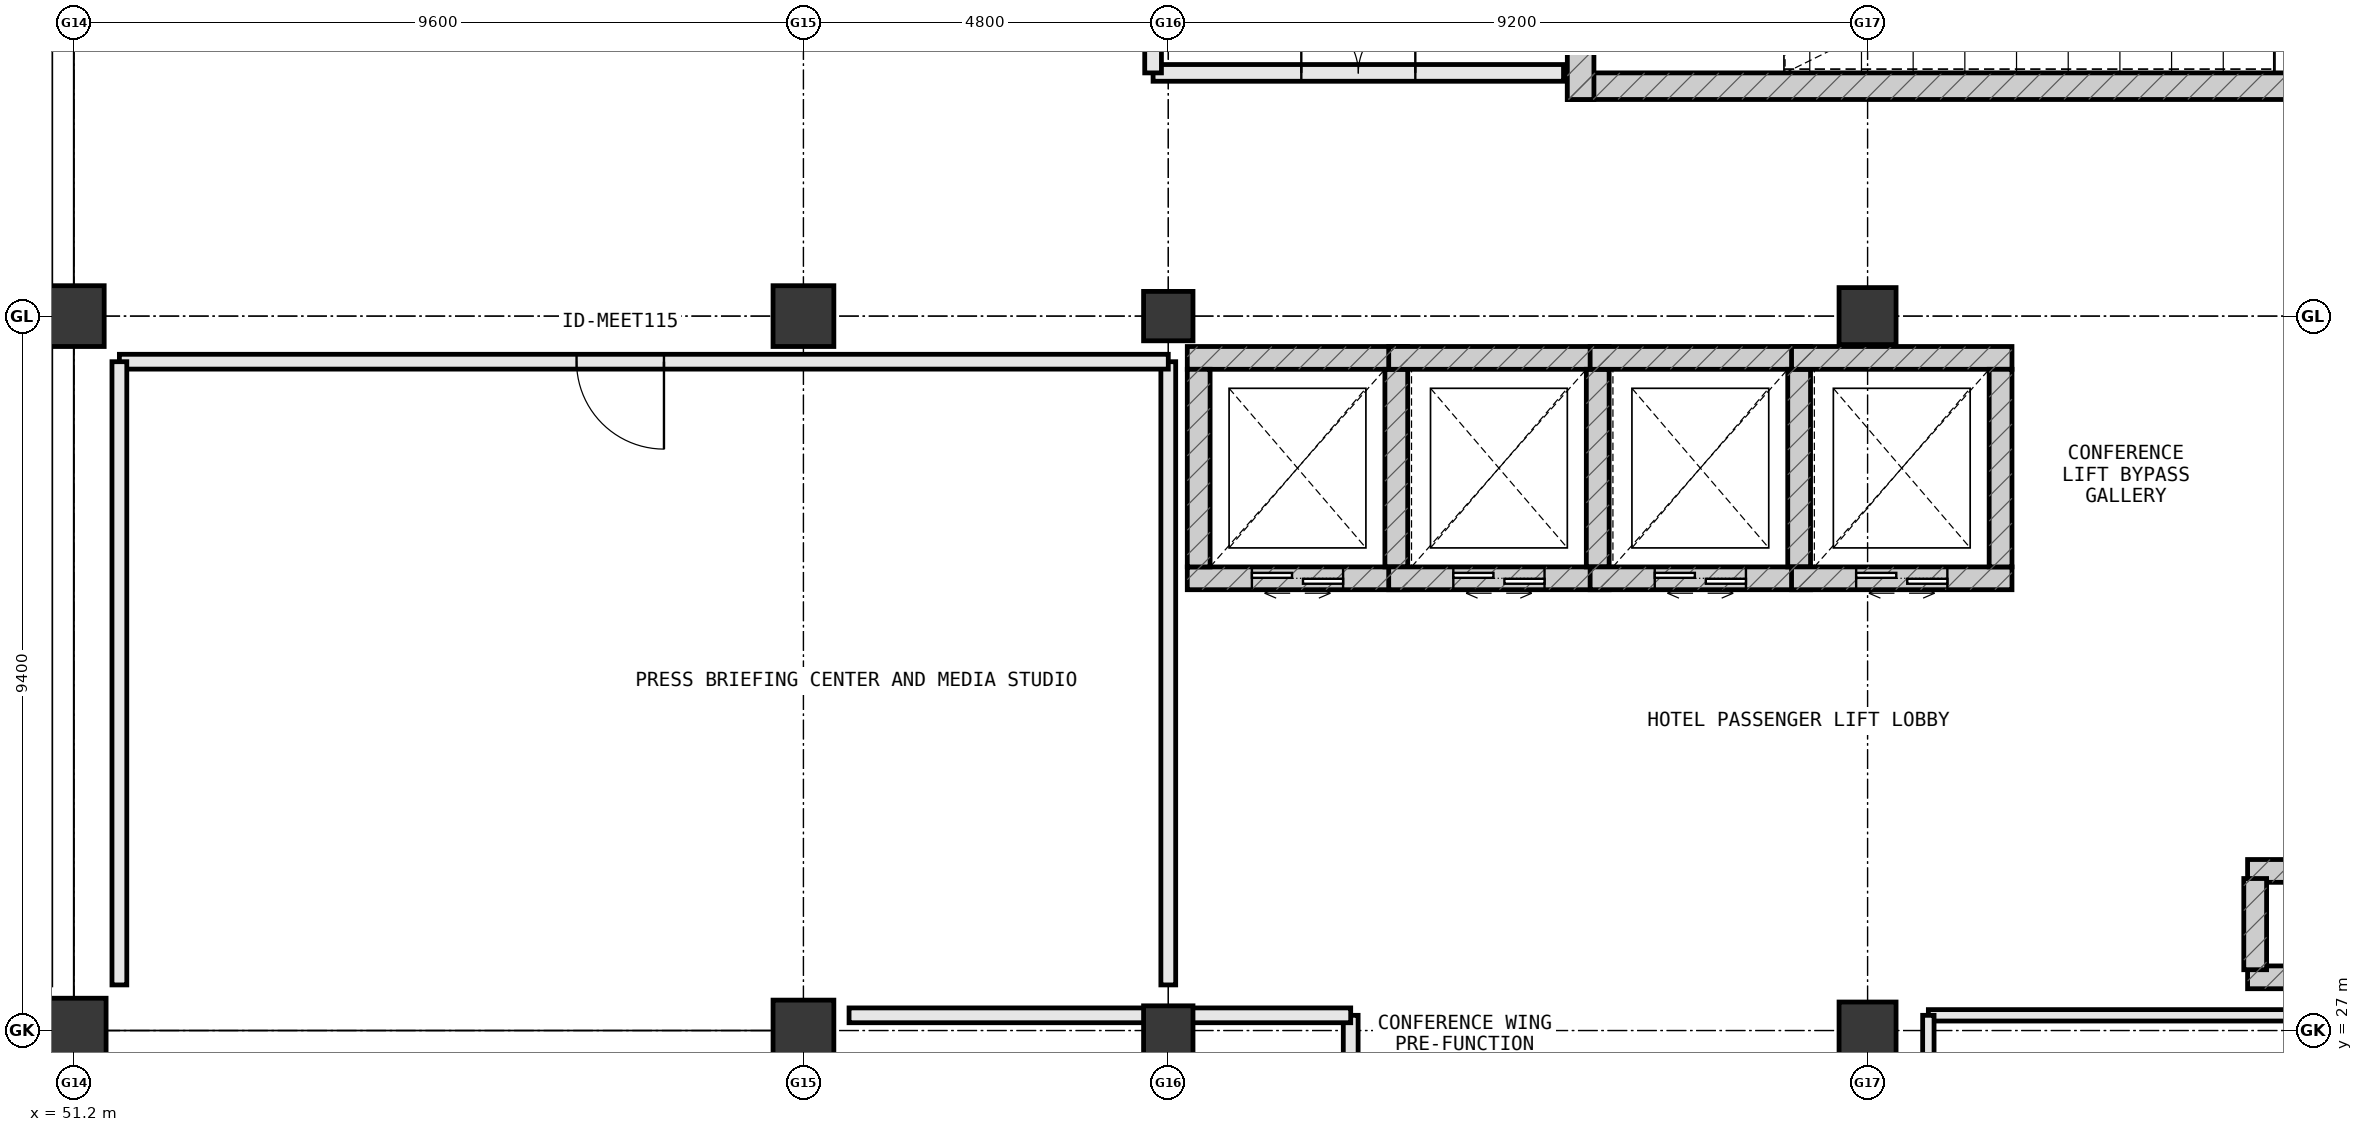
"""IFC4 building model, lengths in metres.
Left out: names, types, materials, properties, quantities, classifications, styles, units other than length and angle.
Written with IfcOpenShell. Run it as: python <this file> out.ifc"""

import sys

from ifc_helpers import new_model, si_unit, direction, frame, frame_2d, origin, origin_2d, place, context, subcontext, project, spatial, rectangle, extrude, element, fill, save


model = new_model("IFC4")
c1 = context("Model", 3, precision=1e-05, world=origin(), true_north=direction((0.0, 1.0)))
c2 = subcontext(c1, "Body", "Model", "MODEL_VIEW")
j1 = project(units=[si_unit("LENGTHUNIT", "METRE"), si_unit("PLANEANGLEUNIT", "RADIAN")], contexts=[c1])
p1 = place(None, origin())
s1 = spatial("IfcSite", under=j1, at=p1, CompositionType="ELEMENT")
p2 = place(p1, origin())
s2 = spatial("IfcBuilding", under=s1, at=p2, CompositionType="ELEMENT")
p3 = place(p2, frame((0.0, 0.0, 5.4)))
s3 = spatial("IfcBuildingStorey", under=s2, at=p3, CompositionType="ELEMENT", Elevation=5.4)
for number, where, z_axis, x_axis in (
    (1, (60.8, 27.0, 0.0), (0.0, 0.0, 1.0), (1.0, 0.0, 0.0)),
    (2, (60.8, 36.4, 0.0), (0.0, 0.0, 1.0), (1.0, 0.0, 0.0)),
):
    element("IfcColumn", number, at=place(p3, frame(where, z_axis=z_axis, x_axis=x_axis)), inside=s3, PredefinedType="COLUMN", context=c2, shape_type="SweptSolid", body=[
        extrude(rectangle(XDim=0.8, YDim=0.8, at=origin_2d()), origin(), (0.0, 0.0, 1.0), 5.4),
    ])
for number, where, z_axis, x_axis in (
    (3, (74.8, 27.0, 0.0), (0.0, 0.0, 1.0), (1.0, 0.0, 0.0)),
    (4, (74.8, 36.4, 0.0), (0.0, 0.0, 1.0), (1.0, 0.0, 0.0)),
):
    element("IfcColumn", number, at=place(p3, frame(where, z_axis=z_axis, x_axis=x_axis)), inside=s3, PredefinedType="COLUMN", context=c2, shape_type="SweptSolid", body=[
        extrude(rectangle(XDim=0.75, YDim=0.75, at=origin_2d()), origin(), (0.0, 0.0, 1.0), 5.4),
    ])
for number, where, z_axis, x_axis in (
    (5, (65.6, 27.0, 0.0), (0.0, 0.0, 1.0), (1.0, 0.0, 0.0)),
    (6, (65.6, 36.4, 0.0), (0.0, 0.0, 1.0), (1.0, 0.0, 0.0)),
):
    element("IfcColumn", number, at=place(p3, frame(where, z_axis=z_axis, x_axis=x_axis)), inside=s3, PredefinedType="COLUMN", context=c2, shape_type="SweptSolid", body=[
        extrude(rectangle(XDim=0.65, YDim=0.65, at=origin_2d()), origin(), (0.0, 0.0, 1.0), 5.4),
    ])
p4 = place(p3, frame((51.2, 27.0, 0.0), z_axis=(0.0, 0.0, 1.0), x_axis=(1.0, 0.0, 0.0)))
e7 = element("IfcColumn", 7, at=p4, inside=s3, PredefinedType="COLUMN", context=c2, shape_type="SweptSolid", body=[
    extrude(rectangle(XDim=0.85, YDim=0.85, at=origin_2d()), origin(), (0.0, 0.0, 1.0), 5.4),
])
p5 = place(p3, frame((51.2, 36.4, 0.0), z_axis=(0.0, 0.0, 1.0), x_axis=(1.0, 0.0, 0.0)))
e8 = element("IfcColumn", 8, at=p5, inside=s3, PredefinedType="COLUMN", context=c2, shape_type="SweptSolid", body=[
    extrude(rectangle(XDim=0.8, YDim=0.8, at=origin_2d()), origin(), (0.0, 0.0, 1.0), 5.4),
])
for number, where, z_axis, x_axis in (
    (9, (79.8, 27.7, 0.0), (0.0, 0.0, 1.0), (1.0, 0.0, 0.0)),
    (10, (81.4, 29.1, 0.0), (0.0, 0.0, 1.0), (-1.0, 0.0, 0.0)),
):
    element("IfcWall", number, at=place(p3, frame(where, z_axis=z_axis, x_axis=x_axis)), inside=s3, PredefinedType="SHEAR", context=c2, shape_type="SweptSolid", body=[
        extrude(rectangle(XDim=1.6, YDim=0.3, at=frame_2d((0.8, 0.0))), origin(), (0.0, 0.0, 1.0), 5.13),
    ])
p6 = place(p3, frame((79.9, 29.0, 0.0), z_axis=(0.0, 0.0, 1.0), x_axis=(0.0, -1.0, 0.0)))
e11 = element("IfcWall", 11, at=p6, inside=s3, PredefinedType="SHEAR", context=c2, shape_type="SweptSolid", body=[
    extrude(rectangle(XDim=1.2, YDim=0.3, at=frame_2d((0.6, 0.0))), origin(), (0.0, 0.0, 1.0), 5.13),
])
p7 = place(p3, frame((70.85, 39.425, 0.0), z_axis=(0.0, 0.0, 1.0), x_axis=(1.0, 0.0, 0.0)))
e12 = element("IfcWall", 12, at=p7, inside=s3, PredefinedType="SHEAR", context=c2, shape_type="SweptSolid", body=[
    extrude(rectangle(XDim=12.1, YDim=0.35, at=frame_2d((6.05, 0.0))), origin(), (0.0, 0.0, 1.0), 5.4),
])
p8 = place(p3, frame((71.025, 44.35, 0.0), z_axis=(0.0, 0.0, 1.0), x_axis=(0.0, -1.0, 0.0)))
e13 = element("IfcWall", 13, at=p8, inside=s3, PredefinedType="SHEAR", context=c2, shape_type="SweptSolid", body=[
    extrude(rectangle(XDim=5.1, YDim=0.35, at=frame_2d((2.55, 0.0))), origin(), (0.0, 0.0, 1.0), 5.4),
])
p9 = place(p8, frame((2.0, 0.0, 0.0)))
e14 = element("IfcOpeningElement", 14, at=p9, cuts=e13, PredefinedType="OPENING", context=c2, shape_type="SweptSolid", body=[
    extrude(rectangle(XDim=1.1, YDim=2.2, at=frame_2d((0.55, 1.1))), frame((0.0, 0.187, 0.0), z_axis=(0.0, -1.0, 0.0), x_axis=(1.0, 0.0, 0.0)), (0.0, 0.0, 1.0), 0.374),
])
p10 = place(p3, frame((65.85, 32.95, 0.0), z_axis=(0.0, 0.0, 1.0), x_axis=(1.0, 0.0, 0.0)))
e15 = element("IfcWall", 15, at=p10, inside=s3, PredefinedType="SHEAR", context=c2, shape_type="SweptSolid", body=[
    extrude(rectangle(XDim=2.9, YDim=0.3, at=frame_2d((1.45, 0.0))), origin(), (0.0, 0.0, 1.0), 5.4),
])
p11 = place(p10, frame((0.85, 0.0, 0.0)))
e16 = element("IfcOpeningElement", 16, at=p11, cuts=e15, PredefinedType="OPENING", context=c2, shape_type="SweptSolid", body=[
    extrude(rectangle(XDim=1.2, YDim=2.2, at=frame_2d((0.6, 1.1))), frame((0.0, 0.162, 0.0), z_axis=(0.0, -1.0, 0.0), x_axis=(1.0, 0.0, 0.0)), (0.0, 0.0, 1.0), 0.324),
])
p12 = place(p3, frame((68.75, 35.85, 0.0), z_axis=(0.0, 0.0, 1.0), x_axis=(-1.0, 0.0, 0.0)))
e17 = element("IfcWall", 17, at=p12, inside=s3, PredefinedType="SHEAR", context=c2, shape_type="SweptSolid", body=[
    extrude(rectangle(XDim=2.9, YDim=0.3, at=frame_2d((1.45, 0.0))), origin(), (0.0, 0.0, 1.0), 5.4),
])
for number, where, z_axis, x_axis in (
    (18, (68.6, 33.1, 0.0), (0.0, 0.0, 1.0), (0.0, 1.0, 0.0)),
    (19, (66.0, 35.7, 0.0), (0.0, 0.0, 1.0), (0.0, -1.0, 0.0)),
):
    element("IfcWall", number, at=place(p3, frame(where, z_axis=z_axis, x_axis=x_axis)), inside=s3, PredefinedType="SHEAR", context=c2, shape_type="SweptSolid", body=[
        extrude(rectangle(XDim=2.6, YDim=0.3, at=frame_2d((1.3, 0.0))), origin(), (0.0, 0.0, 1.0), 5.4),
    ])
p13 = place(p3, frame((68.5, 32.95, 0.0), z_axis=(0.0, 0.0, 1.0), x_axis=(1.0, 0.0, 0.0)))
e20 = element("IfcWall", 20, at=p13, inside=s3, PredefinedType="SHEAR", context=c2, shape_type="SweptSolid", body=[
    extrude(rectangle(XDim=2.9, YDim=0.3, at=frame_2d((1.45, 0.0))), origin(), (0.0, 0.0, 1.0), 5.4),
])
p14 = place(p13, frame((0.85, 0.0, 0.0)))
e21 = element("IfcOpeningElement", 21, at=p14, cuts=e20, PredefinedType="OPENING", context=c2, shape_type="SweptSolid", body=[
    extrude(rectangle(XDim=1.2, YDim=2.2, at=frame_2d((0.6, 1.1))), frame((0.0, 0.162, 0.0), z_axis=(0.0, -1.0, 0.0), x_axis=(1.0, 0.0, 0.0)), (0.0, 0.0, 1.0), 0.324),
])
p15 = place(p3, frame((71.4, 35.85, 0.0), z_axis=(0.0, 0.0, 1.0), x_axis=(-1.0, 0.0, 0.0)))
e22 = element("IfcWall", 22, at=p15, inside=s3, PredefinedType="SHEAR", context=c2, shape_type="SweptSolid", body=[
    extrude(rectangle(XDim=2.9, YDim=0.3, at=frame_2d((1.45, 0.0))), origin(), (0.0, 0.0, 1.0), 5.4),
])
p16 = place(p3, frame((71.25, 33.1, 0.0), z_axis=(0.0, 0.0, 1.0), x_axis=(0.0, 1.0, 0.0)))
e23 = element("IfcWall", 23, at=p16, inside=s3, PredefinedType="SHEAR", context=c2, shape_type="SweptSolid", body=[
    extrude(rectangle(XDim=2.6, YDim=0.3, at=frame_2d((1.3, 0.0))), origin(), (0.0, 0.0, 1.0), 5.4),
])
p17 = place(p3, frame((71.15, 32.95, 0.0), z_axis=(0.0, 0.0, 1.0), x_axis=(1.0, 0.0, 0.0)))
e24 = element("IfcWall", 24, at=p17, inside=s3, PredefinedType="SHEAR", context=c2, shape_type="SweptSolid", body=[
    extrude(rectangle(XDim=2.9, YDim=0.3, at=frame_2d((1.45, 0.0))), origin(), (0.0, 0.0, 1.0), 5.4),
])
p18 = place(p17, frame((0.85, 0.0, 0.0)))
e25 = element("IfcOpeningElement", 25, at=p18, cuts=e24, PredefinedType="OPENING", context=c2, shape_type="SweptSolid", body=[
    extrude(rectangle(XDim=1.2, YDim=2.2, at=frame_2d((0.6, 1.1))), frame((0.0, 0.162, 0.0), z_axis=(0.0, -1.0, 0.0), x_axis=(1.0, 0.0, 0.0)), (0.0, 0.0, 1.0), 0.324),
])
p19 = place(p3, frame((74.05, 35.85, 0.0), z_axis=(0.0, 0.0, 1.0), x_axis=(-1.0, 0.0, 0.0)))
e26 = element("IfcWall", 26, at=p19, inside=s3, PredefinedType="SHEAR", context=c2, shape_type="SweptSolid", body=[
    extrude(rectangle(XDim=2.9, YDim=0.3, at=frame_2d((1.45, 0.0))), origin(), (0.0, 0.0, 1.0), 5.4),
])
p20 = place(p3, frame((73.9, 33.1, 0.0), z_axis=(0.0, 0.0, 1.0), x_axis=(0.0, 1.0, 0.0)))
e27 = element("IfcWall", 27, at=p20, inside=s3, PredefinedType="SHEAR", context=c2, shape_type="SweptSolid", body=[
    extrude(rectangle(XDim=2.6, YDim=0.3, at=frame_2d((1.3, 0.0))), origin(), (0.0, 0.0, 1.0), 5.4),
])
p21 = place(p3, frame((73.8, 32.95, 0.0), z_axis=(0.0, 0.0, 1.0), x_axis=(1.0, 0.0, 0.0)))
e28 = element("IfcWall", 28, at=p21, inside=s3, PredefinedType="SHEAR", context=c2, shape_type="SweptSolid", body=[
    extrude(rectangle(XDim=2.9, YDim=0.3, at=frame_2d((1.45, 0.0))), origin(), (0.0, 0.0, 1.0), 5.4),
])
p22 = place(p21, frame((0.85, 0.0, 0.0)))
e29 = element("IfcOpeningElement", 29, at=p22, cuts=e28, PredefinedType="OPENING", context=c2, shape_type="SweptSolid", body=[
    extrude(rectangle(XDim=1.2, YDim=2.2, at=frame_2d((0.6, 1.1))), frame((0.0, 0.162, 0.0), z_axis=(0.0, -1.0, 0.0), x_axis=(1.0, 0.0, 0.0)), (0.0, 0.0, 1.0), 0.324),
])
p23 = place(p3, frame((76.7, 35.85, 0.0), z_axis=(0.0, 0.0, 1.0), x_axis=(-1.0, 0.0, 0.0)))
e30 = element("IfcWall", 30, at=p23, inside=s3, PredefinedType="SHEAR", context=c2, shape_type="SweptSolid", body=[
    extrude(rectangle(XDim=2.9, YDim=0.3, at=frame_2d((1.45, 0.0))), origin(), (0.0, 0.0, 1.0), 5.4),
])
p24 = place(p3, frame((76.55, 33.1, 0.0), z_axis=(0.0, 0.0, 1.0), x_axis=(0.0, 1.0, 0.0)))
e31 = element("IfcWall", 31, at=p24, inside=s3, PredefinedType="SHEAR", context=c2, shape_type="SweptSolid", body=[
    extrude(rectangle(XDim=2.6, YDim=0.3, at=frame_2d((1.3, 0.0))), origin(), (0.0, 0.0, 1.0), 5.4),
])
p25 = place(p3, frame((65.4, 39.6, 0.0), z_axis=(0.0, 0.0, 1.0), x_axis=(1.0, 0.0, 0.0)))
e32 = element("IfcWall", 32, at=p25, inside=s3, PredefinedType="STANDARD", context=c2, shape_type="SweptSolid", body=[
    extrude(rectangle(XDim=5.4, YDim=0.22, at=frame_2d((2.7, 0.0))), origin(), (0.0, 0.0, 1.0), 5.13),
])
p26 = place(p25, frame((1.95, 0.0, 0.0)))
e33 = element("IfcOpeningElement", 33, at=p26, cuts=e32, PredefinedType="OPENING", context=c2, shape_type="SweptSolid", body=[
    extrude(rectangle(XDim=1.5, YDim=2.2, at=frame_2d((0.75, 1.1))), frame((0.0, 0.122, 0.0), z_axis=(0.0, -1.0, 0.0), x_axis=(1.0, 0.0, 0.0)), (0.0, 0.0, 1.0), 0.244),
])
p27 = place(p3, frame((65.4, 43.85, 0.0), z_axis=(0.0, 0.0, 1.0), x_axis=(0.0, -1.0, 0.0)))
e34 = element("IfcWall", 34, at=p27, inside=s3, PredefinedType="STANDARD", context=c2, shape_type="SweptSolid", body=[
    extrude(rectangle(XDim=4.25, YDim=0.22, at=frame_2d((2.125, 0.0))), origin(), (0.0, 0.0, 1.0), 5.13),
])
p28 = place(p27, frame((1.375, 0.0, 0.0)))
e35 = element("IfcOpeningElement", 35, at=p28, cuts=e34, PredefinedType="OPENING", context=c2, shape_type="SweptSolid", body=[
    extrude(rectangle(XDim=1.5, YDim=2.2, at=frame_2d((0.75, 1.1))), frame((0.0, 0.122, 0.0), z_axis=(0.0, -1.0, 0.0), x_axis=(1.0, 0.0, 0.0)), (0.0, 0.0, 1.0), 0.244),
])
p29 = place(p3, frame((68.0, 16.2, 0.0), z_axis=(0.0, 0.0, 1.0), x_axis=(0.0, 1.0, 0.0)))
e36 = element("IfcWall", 36, at=p29, inside=s3, PredefinedType="PARTITIONING", context=c2, shape_type="SweptSolid", body=[
    extrude(rectangle(XDim=11.0, YDim=0.195, at=frame_2d((5.5, 0.0))), origin(), (0.0, 0.0, 1.0), 5.13),
])
p30 = place(p29, frame((4.925, 0.0, 0.0)))
e37 = element("IfcOpeningElement", 37, at=p30, cuts=e36, PredefinedType="OPENING", context=c2, shape_type="SweptSolid", body=[
    extrude(rectangle(XDim=1.15, YDim=2.2, at=frame_2d((0.575, 1.1))), frame((0.0, 0.11, 0.0), z_axis=(0.0, -1.0, 0.0), x_axis=(1.0, 0.0, 0.0)), (0.0, 0.0, 1.0), 0.219),
])
p31 = place(p3, frame((68.0, 27.2, 0.0), z_axis=(0.0, 0.0, 1.0), x_axis=(-1.0, 0.0, 0.0)))
e38 = element("IfcWall", 38, at=p31, inside=s3, PredefinedType="PARTITIONING", context=c2, shape_type="SweptSolid", body=[
    extrude(rectangle(XDim=6.6, YDim=0.195, at=frame_2d((3.3, 0.0))), origin(), (0.0, 0.0, 1.0), 4.505),
])
p32 = place(p3, frame((83.4, 27.2, 0.0), z_axis=(0.0, 0.0, 1.0), x_axis=(-1.0, 0.0, 0.0)))
e39 = element("IfcWall", 39, at=p32, inside=s3, PredefinedType="PLUMBINGWALL", context=c2, shape_type="SweptSolid", body=[
    extrude(rectangle(XDim=7.8, YDim=0.15, at=frame_2d((3.9, 0.0))), origin(), (0.0, 0.0, 1.0), 4.505),
])
p33 = place(p3, frame((75.6, 27.2, 0.0), z_axis=(0.0, 0.0, 1.0), x_axis=(0.0, -1.0, 0.0)))
e40 = element("IfcWall", 40, at=p33, inside=s3, PredefinedType="PLUMBINGWALL", context=c2, shape_type="SweptSolid", body=[
    extrude(rectangle(XDim=8.6, YDim=0.15, at=frame_2d((4.3, 0.0))), origin(), (0.0, 0.0, 1.0), 5.13),
])
p34 = place(p33, frame((3.825, 0.0, 0.0)))
e41 = element("IfcOpeningElement", 41, at=p34, cuts=e40, PredefinedType="OPENING", context=c2, shape_type="SweptSolid", body=[
    extrude(rectangle(XDim=0.95, YDim=2.15, at=frame_2d((0.475, 1.075))), frame((0.0, 0.087, 0.0), z_axis=(0.0, -1.0, 0.0), x_axis=(1.0, 0.0, 0.0)), (0.0, 0.0, 1.0), 0.174),
])
p35 = place(p3, frame((65.6, 27.6, 0.0), z_axis=(0.0, 0.0, 1.0), x_axis=(0.0, 1.0, 0.0)))
e42 = element("IfcWall", 42, at=p35, inside=s3, PredefinedType="PARTITIONING", context=c2, shape_type="SweptSolid", body=[
    extrude(rectangle(XDim=8.2, YDim=0.195, at=frame_2d((4.1, 0.0))), origin(), (0.0, 0.0, 1.0), 4.505),
])
p36 = place(p3, frame((65.6, 35.8, 0.0), z_axis=(0.0, 0.0, 1.0), x_axis=(-1.0, 0.0, 0.0)))
e43 = element("IfcWall", 43, at=p36, inside=s3, PredefinedType="PARTITIONING", context=c2, shape_type="SweptSolid", body=[
    extrude(rectangle(XDim=13.8, YDim=0.195, at=frame_2d((6.9, 0.0))), origin(), (0.0, 0.0, 1.0), 5.13),
])
p37 = place(p36, frame((6.635, 0.0, 0.0)))
e44 = element("IfcOpeningElement", 44, at=p37, cuts=e43, PredefinedType="OPENING", context=c2, shape_type="SweptSolid", body=[
    extrude(rectangle(XDim=1.15, YDim=2.2, at=frame_2d((0.575, 1.1))), frame((0.0, 0.11, 0.0), z_axis=(0.0, -1.0, 0.0), x_axis=(1.0, 0.0, 0.0)), (0.0, 0.0, 1.0), 0.219),
])
p38 = place(p3, frame((51.8, 35.8, 0.0), z_axis=(0.0, 0.0, 1.0), x_axis=(0.0, -1.0, 0.0)))
e45 = element("IfcWall", 45, at=p38, inside=s3, PredefinedType="PARTITIONING", context=c2, shape_type="SweptSolid", body=[
    extrude(rectangle(XDim=8.2, YDim=0.195, at=frame_2d((4.1, 0.0))), origin(), (0.0, 0.0, 1.0), 5.13),
])
p39 = place(p11, origin())
e46 = element("IfcDoor", 46, at=p39, inside=s3, OperationType="DOUBLE_DOOR_SLIDING", PredefinedType="DOOR", context=c2, shape_type="SweptSolid", body=[
    extrude(rectangle(XDim=1.2, YDim=2.2, at=frame_2d((0.6, 1.1))), frame((0.0, 0.025, 0.0), z_axis=(0.0, -1.0, 0.0), x_axis=(1.0, 0.0, 0.0)), (0.0, 0.0, 1.0), 0.05),
])
fill(e16, e46)
p40 = place(p14, origin())
e47 = element("IfcDoor", 47, at=p40, inside=s3, OperationType="DOUBLE_DOOR_SLIDING", PredefinedType="DOOR", context=c2, shape_type="SweptSolid", body=[
    extrude(rectangle(XDim=1.2, YDim=2.2, at=frame_2d((0.6, 1.1))), frame((0.0, 0.025, 0.0), z_axis=(0.0, -1.0, 0.0), x_axis=(1.0, 0.0, 0.0)), (0.0, 0.0, 1.0), 0.05),
])
fill(e21, e47)
p41 = place(p18, origin())
e48 = element("IfcDoor", 48, at=p41, inside=s3, OperationType="DOUBLE_DOOR_SLIDING", PredefinedType="DOOR", context=c2, shape_type="SweptSolid", body=[
    extrude(rectangle(XDim=1.2, YDim=2.2, at=frame_2d((0.6, 1.1))), frame((0.0, 0.025, 0.0), z_axis=(0.0, -1.0, 0.0), x_axis=(1.0, 0.0, 0.0)), (0.0, 0.0, 1.0), 0.05),
])
fill(e25, e48)
p42 = place(p22, origin())
e49 = element("IfcDoor", 49, at=p42, inside=s3, OperationType="DOUBLE_DOOR_SLIDING", PredefinedType="DOOR", context=c2, shape_type="SweptSolid", body=[
    extrude(rectangle(XDim=1.2, YDim=2.2, at=frame_2d((0.6, 1.1))), frame((0.0, 0.025, 0.0), z_axis=(0.0, -1.0, 0.0), x_axis=(1.0, 0.0, 0.0)), (0.0, 0.0, 1.0), 0.05),
])
fill(e29, e49)
p43 = place(p26, origin())
e50 = element("IfcDoor", 50, at=p43, inside=s3, OperationType="DOUBLE_DOOR_SINGLE_SWING", PredefinedType="DOOR", context=c2, shape_type="SweptSolid", body=[
    extrude(rectangle(XDim=1.5, YDim=2.2, at=frame_2d((0.75, 1.1))), frame((0.0, 0.025, 0.0), z_axis=(0.0, -1.0, 0.0), x_axis=(1.0, 0.0, 0.0)), (0.0, 0.0, 1.0), 0.05),
])
fill(e33, e50)
p44 = place(p37, origin())
e51 = element("IfcDoor", 51, at=p44, inside=s3, OperationType="SINGLE_SWING_LEFT", PredefinedType="DOOR", context=c2, shape_type="SweptSolid", body=[
    extrude(rectangle(XDim=1.15, YDim=2.2, at=frame_2d((0.575, 1.1))), frame((0.0, 0.025, 0.0), z_axis=(0.0, -1.0, 0.0), x_axis=(1.0, 0.0, 0.0)), (0.0, 0.0, 1.0), 0.05),
])
fill(e44, e51)
save(model, sys.argv[1])
